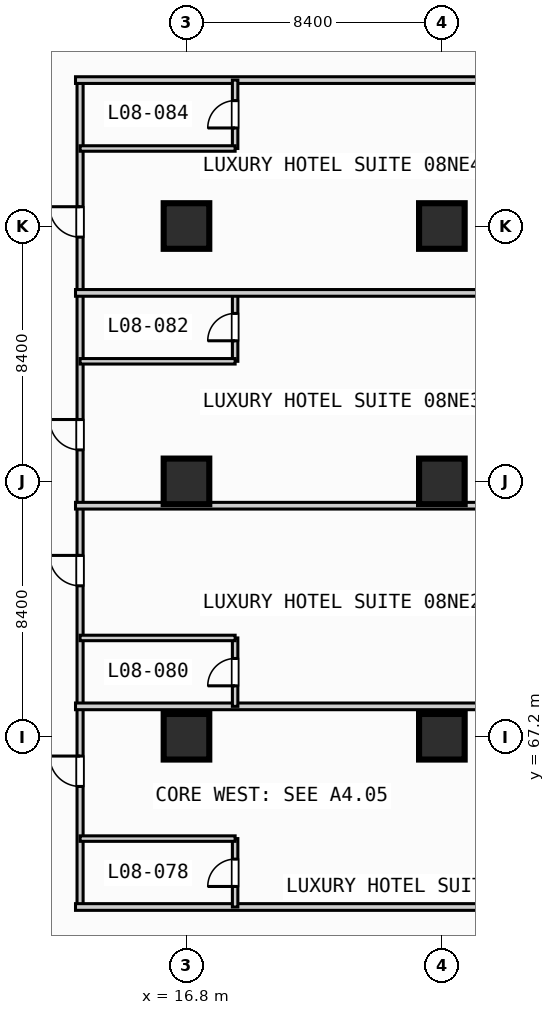
"""IFC4 building model, lengths in metres.
Left out: names, types, materials, properties, quantities, classifications, styles, units other than length and angle.
Written with IfcOpenShell. Run it as: python <this file> out.ifc"""

import sys

from ifc_helpers import new_model, si_unit, direction, frame, frame_2d, origin, origin_2d, place, context, subcontext, project, spatial, rectangle, extrude, element, fill, save


model = new_model("IFC4")
c1 = context("Model", 3, precision=1e-05, world=origin(), true_north=direction((0.0, 1.0)))
c2 = subcontext(c1, "Body", "Model", "MODEL_VIEW")
j1 = project(units=[si_unit("LENGTHUNIT", "METRE"), si_unit("PLANEANGLEUNIT", "RADIAN")], contexts=[c1])
p1 = place(None, origin())
s1 = spatial("IfcSite", under=j1, at=p1, CompositionType="ELEMENT")
p2 = place(p1, origin())
s2 = spatial("IfcBuilding", under=s1, at=p2, CompositionType="ELEMENT")
p3 = place(p2, frame((0.0, 0.0, 39.6)))
s3 = spatial("IfcBuildingStorey", under=s2, at=p3, CompositionType="ELEMENT", Elevation=39.6)
for number, where, z_axis, x_axis in (
    (1, (16.8, 67.2, 0.0), (0.0, 0.0, 1.0), (1.0, 0.0, 0.0)),
    (2, (16.8, 75.6, 0.0), (0.0, 0.0, 1.0), (1.0, 0.0, 0.0)),
    (3, (16.8, 84.0, 0.0), (0.0, 0.0, 1.0), (1.0, 0.0, 0.0)),
    (4, (25.2, 67.2, 0.0), (0.0, 0.0, 1.0), (1.0, 0.0, 0.0)),
    (5, (25.2, 75.6, 0.0), (0.0, 0.0, 1.0), (1.0, 0.0, 0.0)),
    (6, (25.2, 84.0, 0.0), (0.0, 0.0, 1.0), (1.0, 0.0, 0.0)),
):
    element("IfcColumn", number, at=place(p3, frame(where, z_axis=z_axis, x_axis=x_axis)), inside=s3, PredefinedType="COLUMN", context=c2, shape_type="SweptSolid", body=[
        extrude(rectangle(XDim=1.5, YDim=1.5, at=origin_2d()), origin(), (0.0, 0.0, 1.0), 3.8),
    ])
p4 = place(p3, frame((13.3, 61.6, 0.0), z_axis=(0.0, 0.0, 1.0), x_axis=(0.0, 1.0, 0.0)))
e7 = element("IfcWall", 7, at=p4, inside=s3, PredefinedType="PARTITIONING", context=c2, shape_type="SweptSolid", body=[
    extrude(rectangle(XDim=27.2, YDim=0.2, at=frame_2d((13.6, 0.0))), origin(), (0.0, 0.0, 1.0), 3.55),
])
p5 = place(p4, frame((3.965, 0.0, 0.0)))
e8 = element("IfcOpeningElement", 8, at=p5, cuts=e7, PredefinedType="OPENING", context=c2, shape_type="SweptSolid", body=[
    extrude(rectangle(XDim=1.0, YDim=2.15, at=frame_2d((0.5, 1.075))), frame((0.0, 0.11, 0.0), z_axis=(0.0, -1.0, 0.0), x_axis=(1.0, 0.0, 0.0)), (0.0, 0.0, 1.0), 0.22),
])
p6 = place(p4, frame((10.565, 0.0, 0.0)))
e9 = element("IfcOpeningElement", 9, at=p6, cuts=e7, PredefinedType="OPENING", context=c2, shape_type="SweptSolid", body=[
    extrude(rectangle(XDim=1.0, YDim=2.15, at=frame_2d((0.5, 1.075))), frame((0.0, 0.11, 0.0), z_axis=(0.0, -1.0, 0.0), x_axis=(1.0, 0.0, 0.0)), (0.0, 0.0, 1.0), 0.22),
])
p7 = place(p4, frame((15.035, 0.0, 0.0)))
e10 = element("IfcOpeningElement", 10, at=p7, cuts=e7, PredefinedType="OPENING", context=c2, shape_type="SweptSolid", body=[
    extrude(rectangle(XDim=1.0, YDim=2.15, at=frame_2d((0.5, 1.075))), frame((0.0, 0.11, 0.0), z_axis=(0.0, -1.0, 0.0), x_axis=(1.0, 0.0, 0.0)), (0.0, 0.0, 1.0), 0.22),
])
p8 = place(p4, frame((22.035, 0.0, 0.0)))
e11 = element("IfcOpeningElement", 11, at=p8, cuts=e7, PredefinedType="OPENING", context=c2, shape_type="SweptSolid", body=[
    extrude(rectangle(XDim=1.0, YDim=2.15, at=frame_2d((0.5, 1.075))), frame((0.0, 0.11, 0.0), z_axis=(0.0, -1.0, 0.0), x_axis=(1.0, 0.0, 0.0)), (0.0, 0.0, 1.0), 0.22),
])
p9 = place(p3, frame((13.15, 61.6, 0.0), z_axis=(0.0, 0.0, 1.0), x_axis=(1.0, 0.0, 0.0)))
e12 = element("IfcWall", 12, at=p9, inside=s3, PredefinedType="PARTITIONING", context=c2, shape_type="SweptSolid", body=[
    extrude(rectangle(XDim=20.28, YDim=0.22, at=frame_2d((10.14, 0.0))), origin(), (0.0, 0.0, 1.0), 3.55),
])
p10 = place(p3, frame((18.4, 61.6, 0.0), z_axis=(0.0, 0.0, 1.0), x_axis=(0.0, 1.0, 0.0)))
e13 = element("IfcWall", 13, at=p10, inside=s3, PredefinedType="PLUMBINGWALL", context=c2, shape_type="SweptSolid", body=[
    extrude(rectangle(XDim=2.25, YDim=0.18, at=frame_2d((1.125, 0.0))), origin(), (0.0, 0.0, 1.0), 3.55),
])
p11 = place(p10, frame((0.675, 0.0, 0.0)))
e14 = element("IfcOpeningElement", 14, at=p11, cuts=e13, PredefinedType="OPENING", context=c2, shape_type="SweptSolid", body=[
    extrude(rectangle(XDim=0.9, YDim=2.1, at=frame_2d((0.45, 1.05))), frame((0.0, 0.1, 0.0), z_axis=(0.0, -1.0, 0.0), x_axis=(1.0, 0.0, 0.0)), (0.0, 0.0, 1.0), 0.2),
])
p12 = place(p3, frame((13.3, 63.85, 0.0), z_axis=(0.0, 0.0, 1.0), x_axis=(1.0, 0.0, 0.0)))
e15 = element("IfcWall", 15, at=p12, inside=s3, PredefinedType="PLUMBINGWALL", context=c2, shape_type="SweptSolid", body=[
    extrude(rectangle(XDim=5.1, YDim=0.18, at=frame_2d((2.55, 0.0))), origin(), (0.0, 0.0, 1.0), 3.55),
])
p13 = place(p3, frame((13.15, 68.2, 0.0), z_axis=(0.0, 0.0, 1.0), x_axis=(1.0, 0.0, 0.0)))
e16 = element("IfcWall", 16, at=p13, inside=s3, PredefinedType="PARTITIONING", context=c2, shape_type="SweptSolid", body=[
    extrude(rectangle(XDim=20.28, YDim=0.22, at=frame_2d((10.14, 0.0))), origin(), (0.0, 0.0, 1.0), 3.55),
])
p14 = place(p3, frame((18.4, 68.2, 0.0), z_axis=(0.0, 0.0, 1.0), x_axis=(0.0, 1.0, 0.0)))
e17 = element("IfcWall", 17, at=p14, inside=s3, PredefinedType="PLUMBINGWALL", context=c2, shape_type="SweptSolid", body=[
    extrude(rectangle(XDim=2.25, YDim=0.18, at=frame_2d((1.125, 0.0))), origin(), (0.0, 0.0, 1.0), 3.55),
])
p15 = place(p14, frame((0.675, 0.0, 0.0)))
e18 = element("IfcOpeningElement", 18, at=p15, cuts=e17, PredefinedType="OPENING", context=c2, shape_type="SweptSolid", body=[
    extrude(rectangle(XDim=0.9, YDim=2.1, at=frame_2d((0.45, 1.05))), frame((0.0, 0.1, 0.0), z_axis=(0.0, -1.0, 0.0), x_axis=(1.0, 0.0, 0.0)), (0.0, 0.0, 1.0), 0.2),
])
p16 = place(p3, frame((13.3, 70.45, 0.0), z_axis=(0.0, 0.0, 1.0), x_axis=(1.0, 0.0, 0.0)))
e19 = element("IfcWall", 19, at=p16, inside=s3, PredefinedType="PLUMBINGWALL", context=c2, shape_type="SweptSolid", body=[
    extrude(rectangle(XDim=5.1, YDim=0.18, at=frame_2d((2.55, 0.0))), origin(), (0.0, 0.0, 1.0), 3.55),
])
p17 = place(p3, frame((13.15, 74.8, 0.0), z_axis=(0.0, 0.0, 1.0), x_axis=(1.0, 0.0, 0.0)))
e20 = element("IfcWall", 20, at=p17, inside=s3, PredefinedType="PARTITIONING", context=c2, shape_type="SweptSolid", body=[
    extrude(rectangle(XDim=20.28, YDim=0.22, at=frame_2d((10.14, 0.0))), origin(), (0.0, 0.0, 1.0), 3.55),
])
p18 = place(p3, frame((18.4, 79.55, 0.0), z_axis=(0.0, 0.0, 1.0), x_axis=(0.0, 1.0, 0.0)))
e21 = element("IfcWall", 21, at=p18, inside=s3, PredefinedType="PLUMBINGWALL", context=c2, shape_type="SweptSolid", body=[
    extrude(rectangle(XDim=2.25, YDim=0.18, at=frame_2d((1.125, 0.0))), origin(), (0.0, 0.0, 1.0), 3.55),
])
p19 = place(p18, frame((0.675, 0.0, 0.0)))
e22 = element("IfcOpeningElement", 22, at=p19, cuts=e21, PredefinedType="OPENING", context=c2, shape_type="SweptSolid", body=[
    extrude(rectangle(XDim=0.9, YDim=2.1, at=frame_2d((0.45, 1.05))), frame((0.0, 0.1, 0.0), z_axis=(0.0, -1.0, 0.0), x_axis=(1.0, 0.0, 0.0)), (0.0, 0.0, 1.0), 0.2),
])
p20 = place(p3, frame((13.3, 79.55, 0.0), z_axis=(0.0, 0.0, 1.0), x_axis=(1.0, 0.0, 0.0)))
e23 = element("IfcWall", 23, at=p20, inside=s3, PredefinedType="PLUMBINGWALL", context=c2, shape_type="SweptSolid", body=[
    extrude(rectangle(XDim=5.1, YDim=0.18, at=frame_2d((2.55, 0.0))), origin(), (0.0, 0.0, 1.0), 3.55),
])
for number, where, z_axis, x_axis in (
    (24, (13.15, 81.8, 0.0), (0.0, 0.0, 1.0), (1.0, 0.0, 0.0)),
    (25, (13.15, 88.8, 0.0), (0.0, 0.0, 1.0), (1.0, 0.0, 0.0)),
):
    element("IfcWall", number, at=place(p3, frame(where, z_axis=z_axis, x_axis=x_axis)), inside=s3, PredefinedType="PARTITIONING", context=c2, shape_type="SweptSolid", body=[
        extrude(rectangle(XDim=20.28, YDim=0.22, at=frame_2d((10.14, 0.0))), origin(), (0.0, 0.0, 1.0), 3.55),
    ])
p21 = place(p3, frame((18.4, 86.55, 0.0), z_axis=(0.0, 0.0, 1.0), x_axis=(0.0, 1.0, 0.0)))
e26 = element("IfcWall", 26, at=p21, inside=s3, PredefinedType="PLUMBINGWALL", context=c2, shape_type="SweptSolid", body=[
    extrude(rectangle(XDim=2.25, YDim=0.18, at=frame_2d((1.125, 0.0))), origin(), (0.0, 0.0, 1.0), 3.55),
])
p22 = place(p21, frame((0.675, 0.0, 0.0)))
e27 = element("IfcOpeningElement", 27, at=p22, cuts=e26, PredefinedType="OPENING", context=c2, shape_type="SweptSolid", body=[
    extrude(rectangle(XDim=0.9, YDim=2.1, at=frame_2d((0.45, 1.05))), frame((0.0, 0.1, 0.0), z_axis=(0.0, -1.0, 0.0), x_axis=(1.0, 0.0, 0.0)), (0.0, 0.0, 1.0), 0.2),
])
p23 = place(p3, frame((13.3, 86.55, 0.0), z_axis=(0.0, 0.0, 1.0), x_axis=(1.0, 0.0, 0.0)))
e28 = element("IfcWall", 28, at=p23, inside=s3, PredefinedType="PLUMBINGWALL", context=c2, shape_type="SweptSolid", body=[
    extrude(rectangle(XDim=5.1, YDim=0.18, at=frame_2d((2.55, 0.0))), origin(), (0.0, 0.0, 1.0), 3.55),
])
p24 = place(p5, origin())
e29 = element("IfcDoor", 29, at=p24, inside=s3, OperationType="SINGLE_SWING_RIGHT", PredefinedType="DOOR", context=c2, shape_type="SweptSolid", body=[
    extrude(rectangle(XDim=1.0, YDim=2.15, at=frame_2d((0.5, 1.075))), frame((0.0, 0.025, 0.0), z_axis=(0.0, -1.0, 0.0), x_axis=(1.0, 0.0, 0.0)), (0.0, 0.0, 1.0), 0.05),
])
fill(e8, e29)
p25 = place(p6, origin())
e30 = element("IfcDoor", 30, at=p25, inside=s3, OperationType="SINGLE_SWING_RIGHT", PredefinedType="DOOR", context=c2, shape_type="SweptSolid", body=[
    extrude(rectangle(XDim=1.0, YDim=2.15, at=frame_2d((0.5, 1.075))), frame((0.0, 0.025, 0.0), z_axis=(0.0, -1.0, 0.0), x_axis=(1.0, 0.0, 0.0)), (0.0, 0.0, 1.0), 0.05),
])
fill(e9, e30)
p26 = place(p7, origin())
e31 = element("IfcDoor", 31, at=p26, inside=s3, OperationType="SINGLE_SWING_RIGHT", PredefinedType="DOOR", context=c2, shape_type="SweptSolid", body=[
    extrude(rectangle(XDim=1.0, YDim=2.15, at=frame_2d((0.5, 1.075))), frame((0.0, 0.025, 0.0), z_axis=(0.0, -1.0, 0.0), x_axis=(1.0, 0.0, 0.0)), (0.0, 0.0, 1.0), 0.05),
])
fill(e10, e31)
p27 = place(p8, origin())
e32 = element("IfcDoor", 32, at=p27, inside=s3, OperationType="SINGLE_SWING_RIGHT", PredefinedType="DOOR", context=c2, shape_type="SweptSolid", body=[
    extrude(rectangle(XDim=1.0, YDim=2.15, at=frame_2d((0.5, 1.075))), frame((0.0, 0.025, 0.0), z_axis=(0.0, -1.0, 0.0), x_axis=(1.0, 0.0, 0.0)), (0.0, 0.0, 1.0), 0.05),
])
fill(e11, e32)
p28 = place(p11, origin())
e33 = element("IfcDoor", 33, at=p28, inside=s3, OperationType="SINGLE_SWING_LEFT", PredefinedType="DOOR", context=c2, shape_type="SweptSolid", body=[
    extrude(rectangle(XDim=0.9, YDim=2.1, at=frame_2d((0.45, 1.05))), frame((0.0, 0.025, 0.0), z_axis=(0.0, -1.0, 0.0), x_axis=(1.0, 0.0, 0.0)), (0.0, 0.0, 1.0), 0.05),
])
fill(e14, e33)
p29 = place(p15, origin())
e34 = element("IfcDoor", 34, at=p29, inside=s3, OperationType="SINGLE_SWING_LEFT", PredefinedType="DOOR", context=c2, shape_type="SweptSolid", body=[
    extrude(rectangle(XDim=0.9, YDim=2.1, at=frame_2d((0.45, 1.05))), frame((0.0, 0.025, 0.0), z_axis=(0.0, -1.0, 0.0), x_axis=(1.0, 0.0, 0.0)), (0.0, 0.0, 1.0), 0.05),
])
fill(e18, e34)
p30 = place(p19, origin())
e35 = element("IfcDoor", 35, at=p30, inside=s3, OperationType="SINGLE_SWING_LEFT", PredefinedType="DOOR", context=c2, shape_type="SweptSolid", body=[
    extrude(rectangle(XDim=0.9, YDim=2.1, at=frame_2d((0.45, 1.05))), frame((0.0, 0.025, 0.0), z_axis=(0.0, -1.0, 0.0), x_axis=(1.0, 0.0, 0.0)), (0.0, 0.0, 1.0), 0.05),
])
fill(e22, e35)
p31 = place(p22, origin())
e36 = element("IfcDoor", 36, at=p31, inside=s3, OperationType="SINGLE_SWING_LEFT", PredefinedType="DOOR", context=c2, shape_type="SweptSolid", body=[
    extrude(rectangle(XDim=0.9, YDim=2.1, at=frame_2d((0.45, 1.05))), frame((0.0, 0.025, 0.0), z_axis=(0.0, -1.0, 0.0), x_axis=(1.0, 0.0, 0.0)), (0.0, 0.0, 1.0), 0.05),
])
fill(e27, e36)
save(model, sys.argv[1])
